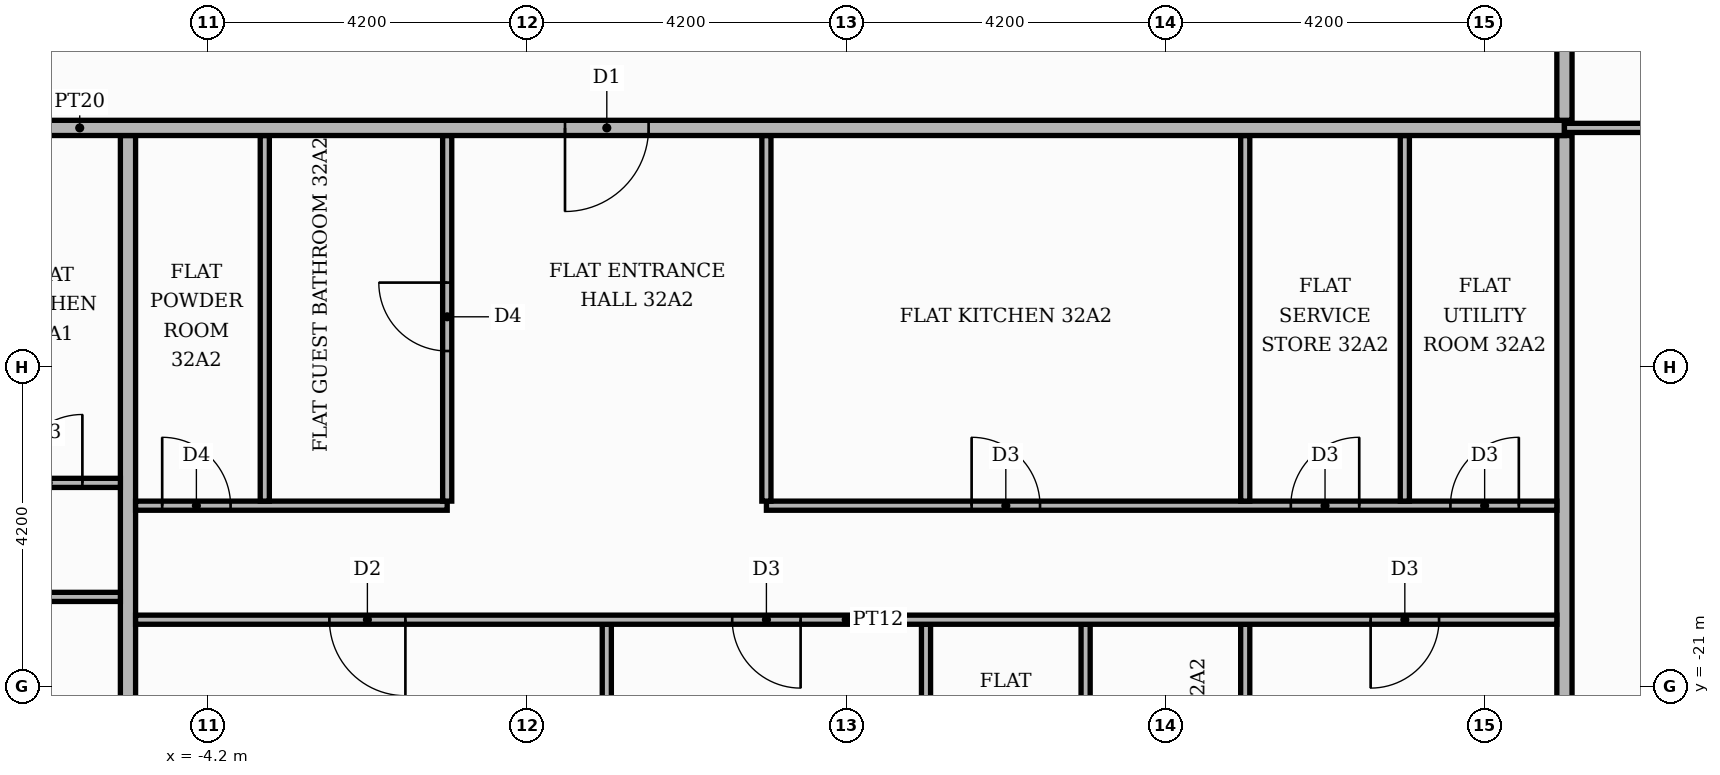
"""IFC4 building model, lengths in metres.
Left out: names, types, materials, properties, quantities, classifications, styles, units other than length and angle.
Written with IfcOpenShell. Run it as: python <this file> out.ifc"""

import sys

from ifc_helpers import new_model, si_unit, direction, frame, frame_2d, origin, place, context, subcontext, project, spatial, rectangle, extrude, element, fill, save


model = new_model("IFC4")
c1 = context("Model", 3, precision=1e-05, world=origin(), true_north=direction((0.0, 1.0)))
c2 = subcontext(c1, "Body", "Model", "MODEL_VIEW")
j1 = project(units=[si_unit("LENGTHUNIT", "METRE"), si_unit("PLANEANGLEUNIT", "RADIAN")], contexts=[c1])
p1 = place(None, origin())
s1 = spatial("IfcSite", under=j1, at=p1, CompositionType="ELEMENT")
p2 = place(p1, origin())
s2 = spatial("IfcBuilding", under=s1, at=p2, CompositionType="ELEMENT")
p3 = place(p2, frame((0.0, 0.0, 137.7)))
s3 = spatial("IfcBuildingStorey", under=s2, at=p3, CompositionType="ELEMENT", Elevation=137.7)
p4 = place(p3, frame((-5.25, -25.42, 0.0), z_axis=(0.0, 0.0, 1.0), x_axis=(0.0, 1.0, 0.0)))
e1 = element("IfcWall", 1, at=p4, inside=s3, PredefinedType="PARTITIONING", context=c2, shape_type="SweptSolid", body=[
    extrude(rectangle(XDim=11.67, YDim=0.2, at=frame_2d((5.835, 0.0))), origin(), (0.0, 0.0, 1.0), 3.48),
])
p5 = place(p3, frame((1.05, -25.42, 0.0), z_axis=(0.0, 0.0, 1.0), x_axis=(0.0, 1.0, 0.0)))
e2 = element("IfcWall", 2, at=p5, inside=s3, PredefinedType="PARTITIONING", context=c2, shape_type="SweptSolid", body=[
    extrude(rectangle(XDim=5.24, YDim=0.12, at=frame_2d((2.62, 0.0))), origin(), (0.0, 0.0, 1.0), 3.48),
])
p6 = place(p3, frame((5.25, -25.42, 0.0), z_axis=(0.0, 0.0, 1.0), x_axis=(0.0, 1.0, 0.0)))
e3 = element("IfcWall", 3, at=p6, inside=s3, PredefinedType="PARTITIONING", context=c2, shape_type="SweptSolid", body=[
    extrude(rectangle(XDim=5.24, YDim=0.12, at=frame_2d((2.62, 0.0))), origin(), (0.0, 0.0, 1.0), 3.48),
])
p7 = place(p6, frame((2.05, 0.0, 0.0)))
e4 = element("IfcOpeningElement", 4, at=p7, cuts=e3, PredefinedType="OPENING", context=c2, shape_type="SweptSolid", body=[
    extrude(rectangle(XDim=0.9, YDim=2.1, at=frame_2d((0.45, 1.05))), frame((0.0, 0.07, 0.0), z_axis=(0.0, -1.0, 0.0), x_axis=(1.0, 0.0, 0.0)), (0.0, 0.0, 1.0), 0.14),
])
p8 = place(p3, frame((7.35, -25.42, 0.0), z_axis=(0.0, 0.0, 1.0), x_axis=(0.0, 1.0, 0.0)))
e5 = element("IfcWall", 5, at=p8, inside=s3, PredefinedType="PARTITIONING", context=c2, shape_type="SweptSolid", body=[
    extrude(rectangle(XDim=5.24, YDim=0.12, at=frame_2d((2.62, 0.0))), origin(), (0.0, 0.0, 1.0), 3.48),
])
p9 = place(p8, frame((2.05, 0.0, 0.0)))
e6 = element("IfcOpeningElement", 6, at=p9, cuts=e5, PredefinedType="OPENING", context=c2, shape_type="SweptSolid", body=[
    extrude(rectangle(XDim=0.9, YDim=2.1, at=frame_2d((0.45, 1.05))), frame((0.0, 0.07, 0.0), z_axis=(0.0, -1.0, 0.0), x_axis=(1.0, 0.0, 0.0)), (0.0, 0.0, 1.0), 0.14),
])
p10 = place(p3, frame((9.45, -25.42, 0.0), z_axis=(0.0, 0.0, 1.0), x_axis=(0.0, 1.0, 0.0)))
e7 = element("IfcWall", 7, at=p10, inside=s3, PredefinedType="PARTITIONING", context=c2, shape_type="SweptSolid", body=[
    extrude(rectangle(XDim=5.24, YDim=0.12, at=frame_2d((2.62, 0.0))), origin(), (0.0, 0.0, 1.0), 3.48),
])
p11 = place(p3, frame((13.65, -25.42, 0.0), z_axis=(0.0, 0.0, 1.0), x_axis=(0.0, 1.0, 0.0)))
e8 = element("IfcWall", 8, at=p11, inside=s3, PredefinedType="PARTITIONING", context=c2, shape_type="SweptSolid", body=[
    extrude(rectangle(XDim=11.67, YDim=0.2, at=frame_2d((5.835, 0.0))), origin(), (0.0, 0.0, 1.0), 3.48),
])
p12 = place(p3, frame((-5.15, -20.12, 0.0), z_axis=(0.0, 0.0, 1.0), x_axis=(1.0, 0.0, 0.0)))
e9 = element("IfcWall", 9, at=p12, inside=s3, PredefinedType="PARTITIONING", context=c2, shape_type="SweptSolid", body=[
    extrude(rectangle(XDim=18.7, YDim=0.12, at=frame_2d((9.35, 0.0))), origin(), (0.0, 0.0, 1.0), 3.48),
])
p13 = place(p12, frame((2.55, 0.0, 0.0)))
e10 = element("IfcOpeningElement", 10, at=p13, cuts=e9, PredefinedType="OPENING", context=c2, shape_type="SweptSolid", body=[
    extrude(rectangle(XDim=1.0, YDim=2.1, at=frame_2d((0.5, 1.05))), frame((0.0, 0.07, 0.0), z_axis=(0.0, -1.0, 0.0), x_axis=(1.0, 0.0, 0.0)), (0.0, 0.0, 1.0), 0.14),
])
p14 = place(p12, frame((7.85, 0.0, 0.0)))
e11 = element("IfcOpeningElement", 11, at=p14, cuts=e9, PredefinedType="OPENING", context=c2, shape_type="SweptSolid", body=[
    extrude(rectangle(XDim=0.9, YDim=2.1, at=frame_2d((0.45, 1.05))), frame((0.0, 0.07, 0.0), z_axis=(0.0, -1.0, 0.0), x_axis=(1.0, 0.0, 0.0)), (0.0, 0.0, 1.0), 0.14),
])
p15 = place(p12, frame((16.25, 0.0, 0.0)))
e12 = element("IfcOpeningElement", 12, at=p15, cuts=e9, PredefinedType="OPENING", context=c2, shape_type="SweptSolid", body=[
    extrude(rectangle(XDim=0.9, YDim=2.1, at=frame_2d((0.45, 1.05))), frame((0.0, 0.07, 0.0), z_axis=(0.0, -1.0, 0.0), x_axis=(1.0, 0.0, 0.0)), (0.0, 0.0, 1.0), 0.14),
])
p16 = place(p3, frame((-17.5, -19.82, 0.0), z_axis=(0.0, 0.0, 1.0), x_axis=(1.0, 0.0, 0.0)))
e13 = element("IfcWall", 13, at=p16, inside=s3, PredefinedType="PARTITIONING", context=c2, shape_type="SweptSolid", body=[
    extrude(rectangle(XDim=12.15, YDim=0.12, at=frame_2d((6.075, 0.0))), origin(), (0.0, 0.0, 1.0), 3.48),
])
p17 = place(p16, frame((2.3, 0.0, 0.0)))
e14 = element("IfcOpeningElement", 14, at=p17, cuts=e13, PredefinedType="OPENING", context=c2, shape_type="SweptSolid", body=[
    extrude(rectangle(XDim=1.0, YDim=2.1, at=frame_2d((0.5, 1.05))), frame((0.0, 0.07, 0.0), z_axis=(0.0, -1.0, 0.0), x_axis=(1.0, 0.0, 0.0)), (0.0, 0.0, 1.0), 0.14),
])
p18 = place(p16, frame((5.5, 0.0, 0.0)))
e15 = element("IfcOpeningElement", 15, at=p18, cuts=e13, PredefinedType="OPENING", context=c2, shape_type="SweptSolid", body=[
    extrude(rectangle(XDim=0.9, YDim=2.1, at=frame_2d((0.45, 1.05))), frame((0.0, 0.07, 0.0), z_axis=(0.0, -1.0, 0.0), x_axis=(1.0, 0.0, 0.0)), (0.0, 0.0, 1.0), 0.14),
])
p19 = place(p3, frame((-5.15, -18.62, 0.0), z_axis=(0.0, 0.0, 1.0), x_axis=(1.0, 0.0, 0.0)))
e16 = element("IfcWall", 16, at=p19, inside=s3, PredefinedType="PARTITIONING", context=c2, shape_type="SweptSolid", body=[
    extrude(rectangle(XDim=4.1, YDim=0.12, at=frame_2d((2.05, 0.0))), origin(), (0.0, 0.0, 1.0), 3.48),
])
p20 = place(p19, frame((0.35, 0.0, 0.0)))
e17 = element("IfcOpeningElement", 17, at=p20, cuts=e16, PredefinedType="OPENING", context=c2, shape_type="SweptSolid", body=[
    extrude(rectangle(XDim=0.9, YDim=2.1, at=frame_2d((0.45, 1.05))), frame((0.0, 0.07, 0.0), z_axis=(0.0, -1.0, 0.0), x_axis=(1.0, 0.0, 0.0)), (0.0, 0.0, 1.0), 0.14),
])
p21 = place(p3, frame((3.15, -18.62, 0.0), z_axis=(0.0, 0.0, 1.0), x_axis=(1.0, 0.0, 0.0)))
e18 = element("IfcWall", 18, at=p21, inside=s3, PredefinedType="PARTITIONING", context=c2, shape_type="SweptSolid", body=[
    extrude(rectangle(XDim=10.4, YDim=0.12, at=frame_2d((5.2, 0.0))), origin(), (0.0, 0.0, 1.0), 3.48),
])
p22 = place(p21, frame((2.7, 0.0, 0.0)))
e19 = element("IfcOpeningElement", 19, at=p22, cuts=e18, PredefinedType="OPENING", context=c2, shape_type="SweptSolid", body=[
    extrude(rectangle(XDim=0.9, YDim=2.1, at=frame_2d((0.45, 1.05))), frame((0.0, 0.07, 0.0), z_axis=(0.0, -1.0, 0.0), x_axis=(1.0, 0.0, 0.0)), (0.0, 0.0, 1.0), 0.14),
])
p23 = place(p21, frame((6.9, 0.0, 0.0)))
e20 = element("IfcOpeningElement", 20, at=p23, cuts=e18, PredefinedType="OPENING", context=c2, shape_type="SweptSolid", body=[
    extrude(rectangle(XDim=0.9, YDim=2.1, at=frame_2d((0.45, 1.05))), frame((0.0, 0.07, 0.0), z_axis=(0.0, -1.0, 0.0), x_axis=(1.0, 0.0, 0.0)), (0.0, 0.0, 1.0), 0.14),
])
p24 = place(p21, frame((9.0, 0.0, 0.0)))
e21 = element("IfcOpeningElement", 21, at=p24, cuts=e18, PredefinedType="OPENING", context=c2, shape_type="SweptSolid", body=[
    extrude(rectangle(XDim=0.9, YDim=2.1, at=frame_2d((0.45, 1.05))), frame((0.0, 0.07, 0.0), z_axis=(0.0, -1.0, 0.0), x_axis=(1.0, 0.0, 0.0)), (0.0, 0.0, 1.0), 0.14),
])
p25 = place(p3, frame((-3.45, -18.56, 0.0), z_axis=(0.0, 0.0, 1.0), x_axis=(0.0, 1.0, 0.0)))
e22 = element("IfcWall", 22, at=p25, inside=s3, PredefinedType="PARTITIONING", context=c2, shape_type="SweptSolid", body=[
    extrude(rectangle(XDim=4.81, YDim=0.12, at=frame_2d((2.405, 0.0))), origin(), (0.0, 0.0, 1.0), 3.48),
])
p26 = place(p3, frame((-1.05, -18.56, 0.0), z_axis=(0.0, 0.0, 1.0), x_axis=(0.0, 1.0, 0.0)))
e23 = element("IfcWall", 23, at=p26, inside=s3, PredefinedType="PARTITIONING", context=c2, shape_type="SweptSolid", body=[
    extrude(rectangle(XDim=4.81, YDim=0.12, at=frame_2d((2.405, 0.0))), origin(), (0.0, 0.0, 1.0), 3.48),
])
p27 = place(p26, frame((1.975, 0.0, 0.0)))
e24 = element("IfcOpeningElement", 24, at=p27, cuts=e23, PredefinedType="OPENING", context=c2, shape_type="SweptSolid", body=[
    extrude(rectangle(XDim=0.9, YDim=2.1, at=frame_2d((0.45, 1.05))), frame((0.0, 0.07, 0.0), z_axis=(0.0, -1.0, 0.0), x_axis=(1.0, 0.0, 0.0)), (0.0, 0.0, 1.0), 0.14),
])
for number, where, z_axis, x_axis in (
    (25, (3.15, -18.56, 0.0), (0.0, 0.0, 1.0), (0.0, 1.0, 0.0)),
    (26, (9.45, -18.56, 0.0), (0.0, 0.0, 1.0), (0.0, 1.0, 0.0)),
    (27, (11.55, -18.56, 0.0), (0.0, 0.0, 1.0), (0.0, 1.0, 0.0)),
):
    element("IfcWall", number, at=place(p3, frame(where, z_axis=z_axis, x_axis=x_axis)), inside=s3, PredefinedType="PARTITIONING", context=c2, shape_type="SweptSolid", body=[
        extrude(rectangle(XDim=4.81, YDim=0.12, at=frame_2d((2.405, 0.0))), origin(), (0.0, 0.0, 1.0), 3.48),
    ])
p28 = place(p3, frame((-9.45, -18.32, 0.0), z_axis=(0.0, 0.0, 1.0), x_axis=(1.0, 0.0, 0.0)))
e28 = element("IfcWall", 28, at=p28, inside=s3, PredefinedType="PARTITIONING", context=c2, shape_type="SweptSolid", body=[
    extrude(rectangle(XDim=4.1, YDim=0.12, at=frame_2d((2.05, 0.0))), origin(), (0.0, 0.0, 1.0), 3.48),
])
p29 = place(p28, frame((2.7, 0.0, 0.0)))
e29 = element("IfcOpeningElement", 29, at=p29, cuts=e28, PredefinedType="OPENING", context=c2, shape_type="SweptSolid", body=[
    extrude(rectangle(XDim=0.9, YDim=2.1, at=frame_2d((0.45, 1.05))), frame((0.0, 0.07, 0.0), z_axis=(0.0, -1.0, 0.0), x_axis=(1.0, 0.0, 0.0)), (0.0, 0.0, 1.0), 0.14),
])
p30 = place(p3, frame((-25.42, -13.65, 0.0), z_axis=(0.0, 0.0, 1.0), x_axis=(1.0, 0.0, 0.0)))
e30 = element("IfcWall", 30, at=p30, inside=s3, PredefinedType="PARTITIONING", context=c2, shape_type="SweptSolid", body=[
    extrude(rectangle(XDim=39.07, YDim=0.2, at=frame_2d((19.535, 0.0))), origin(), (0.0, 0.0, 1.0), 3.48),
])
p31 = place(p30, frame((13.32, 0.0, 0.0)))
e31 = element("IfcOpeningElement", 31, at=p31, cuts=e30, PredefinedType="OPENING", context=c2, shape_type="SweptSolid", body=[
    extrude(rectangle(XDim=1.1, YDim=2.4, at=frame_2d((0.55, 1.2))), frame((0.0, 0.11, 0.0), z_axis=(0.0, -1.0, 0.0), x_axis=(1.0, 0.0, 0.0)), (0.0, 0.0, 1.0), 0.22),
])
p32 = place(p30, frame((25.92, 0.0, 0.0)))
e32 = element("IfcOpeningElement", 32, at=p32, cuts=e30, PredefinedType="OPENING", context=c2, shape_type="SweptSolid", body=[
    extrude(rectangle(XDim=1.1, YDim=2.4, at=frame_2d((0.55, 1.2))), frame((0.0, 0.11, 0.0), z_axis=(0.0, -1.0, 0.0), x_axis=(1.0, 0.0, 0.0)), (0.0, 0.0, 1.0), 0.22),
])
p33 = place(p3, frame((13.65, -13.65, 0.0), z_axis=(0.0, 0.0, 1.0), x_axis=(1.0, 0.0, 0.0)))
e33 = element("IfcWall", 33, at=p33, inside=s3, PredefinedType="PARTITIONING", context=c2, shape_type="SweptSolid", body=[
    extrude(rectangle(XDim=7.07, YDim=0.12, at=frame_2d((3.535, 0.0))), origin(), (0.0, 0.0, 1.0), 3.48),
])
p34 = place(p33, frame((3.085, 0.0, 0.0)))
e34 = element("IfcOpeningElement", 34, at=p34, cuts=e33, PredefinedType="OPENING", context=c2, shape_type="SweptSolid", body=[
    extrude(rectangle(XDim=0.9, YDim=2.1, at=frame_2d((0.45, 1.05))), frame((0.0, 0.07, 0.0), z_axis=(0.0, -1.0, 0.0), x_axis=(1.0, 0.0, 0.0)), (0.0, 0.0, 1.0), 0.14),
])
p35 = place(p3, frame((13.65, -13.55, 0.0), z_axis=(0.0, 0.0, 1.0), x_axis=(0.0, 1.0, 0.0)))
e35 = element("IfcWall", 35, at=p35, inside=s3, PredefinedType="PARTITIONING", context=c2, shape_type="SweptSolid", body=[
    extrude(rectangle(XDim=2.45, YDim=0.2, at=frame_2d((1.225, 0.0))), origin(), (0.0, 0.0, 1.0), 3.48),
])
p36 = place(p29, origin())
e36 = element("IfcDoor", 36, at=p36, inside=s3, OperationType="SINGLE_SWING_RIGHT", PredefinedType="DOOR", context=c2, shape_type="SweptSolid", body=[
    extrude(rectangle(XDim=0.9, YDim=2.1, at=frame_2d((0.45, 1.05))), frame((0.0, 0.025, 0.0), z_axis=(0.0, -1.0, 0.0), x_axis=(1.0, 0.0, 0.0)), (0.0, 0.0, 1.0), 0.05),
])
fill(e29, e36)
p37 = place(p32, frame((1.1, 0.0, 0.0), z_axis=(0.0, 0.0, 1.0), x_axis=(-1.0, 0.0, 0.0)))
e37 = element("IfcDoor", 37, at=p37, inside=s3, OperationType="SINGLE_SWING_LEFT", PredefinedType="DOOR", context=c2, shape_type="SweptSolid", body=[
    extrude(rectangle(XDim=1.1, YDim=2.4, at=frame_2d((0.55, 1.2))), frame((0.0, 0.025, 0.0), z_axis=(0.0, -1.0, 0.0), x_axis=(1.0, 0.0, 0.0)), (0.0, 0.0, 1.0), 0.05),
])
fill(e32, e37)
p38 = place(p20, origin())
e38 = element("IfcDoor", 38, at=p38, inside=s3, OperationType="SINGLE_SWING_LEFT", PredefinedType="DOOR", context=c2, shape_type="SweptSolid", body=[
    extrude(rectangle(XDim=0.9, YDim=2.1, at=frame_2d((0.45, 1.05))), frame((0.0, 0.025, 0.0), z_axis=(0.0, -1.0, 0.0), x_axis=(1.0, 0.0, 0.0)), (0.0, 0.0, 1.0), 0.05),
])
fill(e17, e38)
p39 = place(p27, origin())
e39 = element("IfcDoor", 39, at=p39, inside=s3, OperationType="SINGLE_SWING_RIGHT", PredefinedType="DOOR", context=c2, shape_type="SweptSolid", body=[
    extrude(rectangle(XDim=0.9, YDim=2.1, at=frame_2d((0.45, 1.05))), frame((0.0, 0.025, 0.0), z_axis=(0.0, -1.0, 0.0), x_axis=(1.0, 0.0, 0.0)), (0.0, 0.0, 1.0), 0.05),
])
fill(e24, e39)
p40 = place(p22, origin())
e40 = element("IfcDoor", 40, at=p40, inside=s3, OperationType="SINGLE_SWING_LEFT", PredefinedType="DOOR", context=c2, shape_type="SweptSolid", body=[
    extrude(rectangle(XDim=0.9, YDim=2.1, at=frame_2d((0.45, 1.05))), frame((0.0, 0.025, 0.0), z_axis=(0.0, -1.0, 0.0), x_axis=(1.0, 0.0, 0.0)), (0.0, 0.0, 1.0), 0.05),
])
fill(e19, e40)
p41 = place(p23, origin())
e41 = element("IfcDoor", 41, at=p41, inside=s3, OperationType="SINGLE_SWING_RIGHT", PredefinedType="DOOR", context=c2, shape_type="SweptSolid", body=[
    extrude(rectangle(XDim=0.9, YDim=2.1, at=frame_2d((0.45, 1.05))), frame((0.0, 0.025, 0.0), z_axis=(0.0, -1.0, 0.0), x_axis=(1.0, 0.0, 0.0)), (0.0, 0.0, 1.0), 0.05),
])
fill(e20, e41)
p42 = place(p24, origin())
e42 = element("IfcDoor", 42, at=p42, inside=s3, OperationType="SINGLE_SWING_RIGHT", PredefinedType="DOOR", context=c2, shape_type="SweptSolid", body=[
    extrude(rectangle(XDim=0.9, YDim=2.1, at=frame_2d((0.45, 1.05))), frame((0.0, 0.025, 0.0), z_axis=(0.0, -1.0, 0.0), x_axis=(1.0, 0.0, 0.0)), (0.0, 0.0, 1.0), 0.05),
])
fill(e21, e42)
p43 = place(p13, frame((1.0, 0.0, 0.0), z_axis=(0.0, 0.0, 1.0), x_axis=(-1.0, 0.0, 0.0)))
e43 = element("IfcDoor", 43, at=p43, inside=s3, OperationType="SINGLE_SWING_RIGHT", PredefinedType="DOOR", context=c2, shape_type="SweptSolid", body=[
    extrude(rectangle(XDim=1.0, YDim=2.1, at=frame_2d((0.5, 1.05))), frame((0.0, 0.025, 0.0), z_axis=(0.0, -1.0, 0.0), x_axis=(1.0, 0.0, 0.0)), (0.0, 0.0, 1.0), 0.05),
])
fill(e10, e43)
p44 = place(p14, frame((0.9, 0.0, 0.0), z_axis=(0.0, 0.0, 1.0), x_axis=(-1.0, 0.0, 0.0)))
e44 = element("IfcDoor", 44, at=p44, inside=s3, OperationType="SINGLE_SWING_RIGHT", PredefinedType="DOOR", context=c2, shape_type="SweptSolid", body=[
    extrude(rectangle(XDim=0.9, YDim=2.1, at=frame_2d((0.45, 1.05))), frame((0.0, 0.025, 0.0), z_axis=(0.0, -1.0, 0.0), x_axis=(1.0, 0.0, 0.0)), (0.0, 0.0, 1.0), 0.05),
])
fill(e11, e44)
p45 = place(p15, frame((0.9, 0.0, 0.0), z_axis=(0.0, 0.0, 1.0), x_axis=(-1.0, 0.0, 0.0)))
e45 = element("IfcDoor", 45, at=p45, inside=s3, OperationType="SINGLE_SWING_LEFT", PredefinedType="DOOR", context=c2, shape_type="SweptSolid", body=[
    extrude(rectangle(XDim=0.9, YDim=2.1, at=frame_2d((0.45, 1.05))), frame((0.0, 0.025, 0.0), z_axis=(0.0, -1.0, 0.0), x_axis=(1.0, 0.0, 0.0)), (0.0, 0.0, 1.0), 0.05),
])
fill(e12, e45)
save(model, sys.argv[1])
